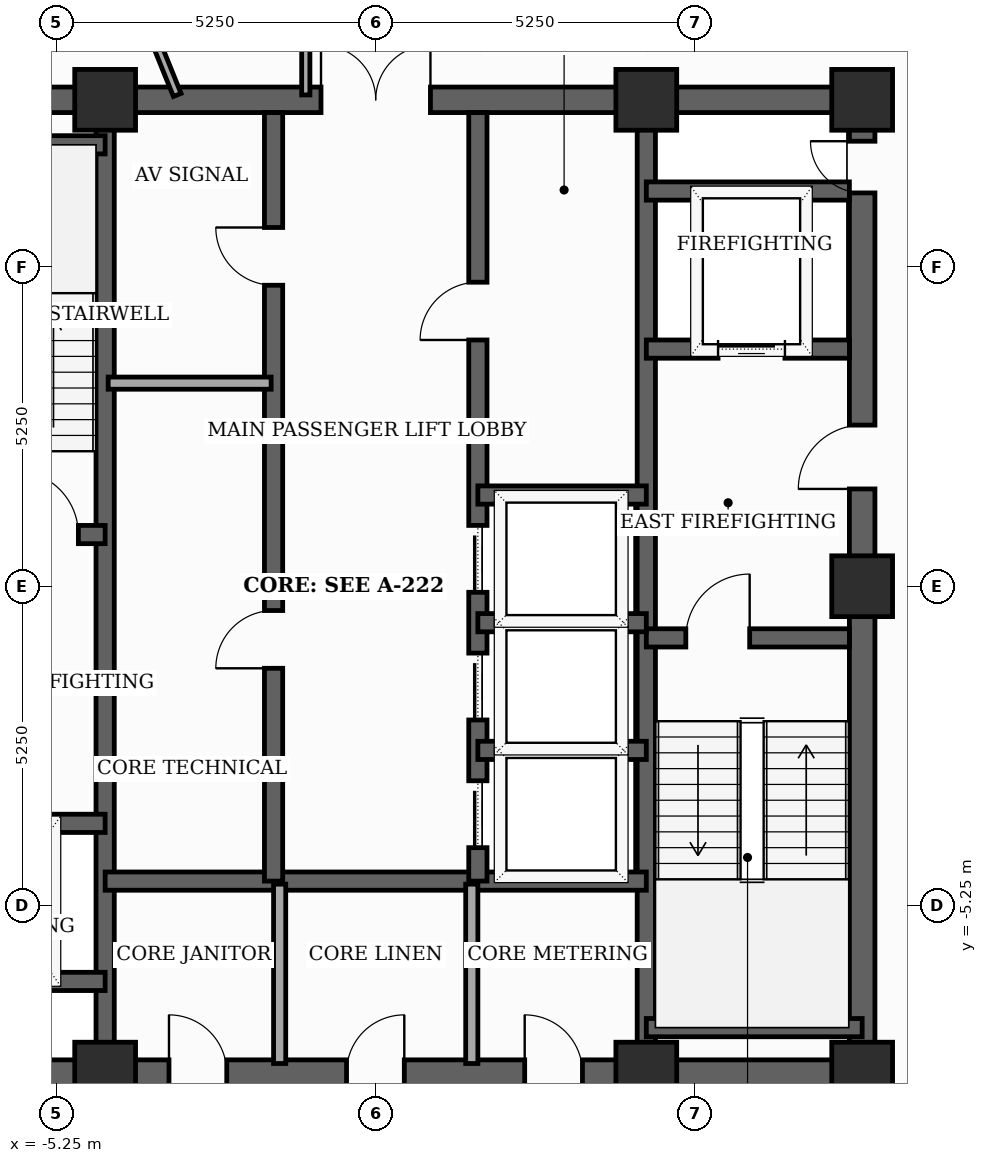
"""IFC4 building model, lengths in metres.
Left out: names, types, materials, properties, quantities, classifications, styles, units other than length and angle.
Written with IfcOpenShell. Run it as: python <this file> out.ifc"""

import sys

from ifc_helpers import new_model, si_unit, direction, frame, frame_2d, origin, origin_2d, place, context, subcontext, project, spatial, rectangle, extrude, element, fill, save


model = new_model("IFC4")
c1 = context("Model", 3, precision=1e-05, world=origin(), true_north=direction((0.0, 1.0)))
c2 = subcontext(c1, "Body", "Model", "MODEL_VIEW")
j1 = project(units=[si_unit("LENGTHUNIT", "METRE"), si_unit("PLANEANGLEUNIT", "RADIAN")], contexts=[c1])
p1 = place(None, origin())
s1 = spatial("IfcSite", under=j1, at=p1, CompositionType="ELEMENT")
p2 = place(p1, origin())
s2 = spatial("IfcBuilding", under=s1, at=p2, CompositionType="ELEMENT")
p3 = place(p2, frame((0.0, 0.0, 267.0)))
s3 = spatial("IfcBuildingStorey", under=s2, at=p3, CompositionType="ELEMENT", Elevation=267.0)
for number, where, z_axis, x_axis in (
    (1, (-4.45, -8.0, 0.0), (0.0, 0.0, 1.0), (1.0, 0.0, 0.0)),
    (2, (4.45, -8.0, 0.0), (0.0, 0.0, 1.0), (1.0, 0.0, 0.0)),
    (3, (8.0, -8.0, 0.0), (0.0, 0.0, 1.0), (1.0, 0.0, 0.0)),
    (4, (8.0, 0.0, 0.0), (0.0, 0.0, 1.0), (1.0, 0.0, 0.0)),
    (5, (8.0, 8.0, 0.0), (0.0, 0.0, 1.0), (1.0, 0.0, 0.0)),
    (6, (4.45, 8.0, 0.0), (0.0, 0.0, 1.0), (1.0, 0.0, 0.0)),
    (7, (-4.45, 8.0, 0.0), (0.0, 0.0, 1.0), (1.0, 0.0, 0.0)),
):
    element("IfcColumn", number, at=place(p3, frame(where, z_axis=z_axis, x_axis=x_axis)), inside=s3, PredefinedType="COLUMN", context=c2, shape_type="SweptSolid", body=[
        extrude(rectangle(XDim=1.0, YDim=1.0, at=origin_2d()), origin(), (0.0, 0.0, 1.0), 3.7),
    ])
p4 = place(p3, frame((8.0, -8.0, 0.0), z_axis=(0.0, 0.0, 1.0), x_axis=(0.0, 1.0, 0.0)))
e8 = element("IfcWall", 8, at=p4, inside=s3, PredefinedType="SHEAR", context=c2, shape_type="SweptSolid", body=[
    extrude(rectangle(XDim=16.0, YDim=0.42, at=frame_2d((8.0, 0.0))), origin(), (0.0, 0.0, 1.0), 3.5),
])
p5 = place(p4, frame((9.6, 0.0, 0.0)))
e9 = element("IfcOpeningElement", 9, at=p5, cuts=e8, PredefinedType="OPENING", context=c2, shape_type="SweptSolid", body=[
    extrude(rectangle(XDim=1.05, YDim=2.15, at=frame_2d((0.525, 1.075))), frame((0.0, 0.22, 0.0), z_axis=(0.0, -1.0, 0.0), x_axis=(1.0, 0.0, 0.0)), (0.0, 0.0, 1.0), 0.44),
])
p6 = place(p4, frame((14.469, 0.0, 0.0)))
e10 = element("IfcOpeningElement", 10, at=p6, cuts=e8, PredefinedType="OPENING", context=c2, shape_type="SweptSolid", body=[
    extrude(rectangle(XDim=0.85, YDim=2.02, at=frame_2d((0.425, 1.01))), frame((0.0, 0.22, 0.0), z_axis=(0.0, -1.0, 0.0), x_axis=(1.0, 0.0, 0.0)), (0.0, 0.0, 1.0), 0.44),
])
p7 = place(p3, frame((-8.0, -8.0, 0.0), z_axis=(0.0, 0.0, 1.0), x_axis=(1.0, 0.0, 0.0)))
e11 = element("IfcWall", 11, at=p7, inside=s3, PredefinedType="SHEAR", context=c2, shape_type="SweptSolid", body=[
    extrude(rectangle(XDim=16.0, YDim=0.42, at=frame_2d((8.0, 0.0))), origin(), (0.0, 0.0, 1.0), 3.5),
])
p8 = place(p7, frame((4.6, 0.0, 0.0)))
e12 = element("IfcOpeningElement", 12, at=p8, cuts=e11, PredefinedType="OPENING", context=c2, shape_type="SweptSolid", body=[
    extrude(rectangle(XDim=0.95, YDim=2.1, at=frame_2d((0.475, 1.05))), frame((0.0, 0.22, 0.0), z_axis=(0.0, -1.0, 0.0), x_axis=(1.0, 0.0, 0.0)), (0.0, 0.0, 1.0), 0.44),
])
p9 = place(p7, frame((7.52, 0.0, 0.0)))
e13 = element("IfcOpeningElement", 13, at=p9, cuts=e11, PredefinedType="OPENING", context=c2, shape_type="SweptSolid", body=[
    extrude(rectangle(XDim=0.95, YDim=2.1, at=frame_2d((0.475, 1.05))), frame((0.0, 0.22, 0.0), z_axis=(0.0, -1.0, 0.0), x_axis=(1.0, 0.0, 0.0)), (0.0, 0.0, 1.0), 0.44),
])
p10 = place(p7, frame((10.45, 0.0, 0.0)))
e14 = element("IfcOpeningElement", 14, at=p10, cuts=e11, PredefinedType="OPENING", context=c2, shape_type="SweptSolid", body=[
    extrude(rectangle(XDim=0.95, YDim=2.1, at=frame_2d((0.475, 1.05))), frame((0.0, 0.22, 0.0), z_axis=(0.0, -1.0, 0.0), x_axis=(1.0, 0.0, 0.0)), (0.0, 0.0, 1.0), 0.44),
])
p11 = place(p3, frame((-8.0, 8.0, 0.0), z_axis=(0.0, 0.0, 1.0), x_axis=(1.0, 0.0, 0.0)))
e15 = element("IfcWall", 15, at=p11, inside=s3, PredefinedType="SHEAR", context=c2, shape_type="SweptSolid", body=[
    extrude(rectangle(XDim=16.0, YDim=0.42, at=frame_2d((8.0, 0.0))), origin(), (0.0, 0.0, 1.0), 3.5),
])
p12 = place(p11, frame((7.1, 0.0, 0.0)))
e16 = element("IfcOpeningElement", 16, at=p12, cuts=e15, PredefinedType="OPENING", context=c2, shape_type="SweptSolid", body=[
    extrude(rectangle(XDim=1.8, YDim=2.15, at=frame_2d((0.9, 1.075))), frame((0.0, 0.22, 0.0), z_axis=(0.0, -1.0, 0.0), x_axis=(1.0, 0.0, 0.0)), (0.0, 0.0, 1.0), 0.44),
])
for number, where, z_axis, x_axis in (
    (17, (-4.45, -7.79, 0.0), (0.0, 0.0, 1.0), (0.0, 1.0, 0.0)),
    (18, (4.45, -7.79, 0.0), (0.0, 0.0, 1.0), (0.0, 1.0, 0.0)),
):
    element("IfcWall", number, at=place(p3, frame(where, z_axis=z_axis, x_axis=x_axis)), inside=s3, PredefinedType="SHEAR", context=c2, shape_type="SweptSolid", body=[
        extrude(rectangle(XDim=15.58, YDim=0.3, at=frame_2d((7.79, 0.0))), origin(), (0.0, 0.0, 1.0), 3.5),
    ])
p13 = place(p3, frame((-7.79, 0.85, 0.0), z_axis=(0.0, 0.0, 1.0), x_axis=(1.0, 0.0, 0.0)))
e19 = element("IfcWall", 19, at=p13, inside=s3, PredefinedType="SHEAR", context=c2, shape_type="SweptSolid", body=[
    extrude(rectangle(XDim=3.34, YDim=0.3, at=frame_2d((1.67, 0.0))), origin(), (0.0, 0.0, 1.0), 3.5),
])
p14 = place(p13, frame((1.85, 0.0, 0.0)))
e20 = element("IfcOpeningElement", 20, at=p14, cuts=e19, PredefinedType="OPENING", context=c2, shape_type="SweptSolid", body=[
    extrude(rectangle(XDim=1.05, YDim=2.15, at=frame_2d((0.525, 1.075))), frame((0.0, 0.16, 0.0), z_axis=(0.0, -1.0, 0.0), x_axis=(1.0, 0.0, 0.0)), (0.0, 0.0, 1.0), 0.32),
])
p15 = place(p3, frame((-7.79, 7.26, 0.0), z_axis=(0.0, 0.0, 1.0), x_axis=(1.0, 0.0, 0.0)))
e21 = element("IfcWall", 21, at=p15, inside=s3, PredefinedType="SHEAR", context=c2, shape_type="SweptSolid", body=[
    extrude(rectangle(XDim=3.34, YDim=0.3, at=frame_2d((1.67, 0.0))), origin(), (0.0, 0.0, 1.0), 3.5),
])
p16 = place(p3, frame((4.45, -0.85, 0.0), z_axis=(0.0, 0.0, 1.0), x_axis=(1.0, 0.0, 0.0)))
e22 = element("IfcWall", 22, at=p16, inside=s3, PredefinedType="SHEAR", context=c2, shape_type="SweptSolid", body=[
    extrude(rectangle(XDim=3.34, YDim=0.3, at=frame_2d((1.67, 0.0))), origin(), (0.0, 0.0, 1.0), 3.5),
])
p17 = place(p16, frame((0.65, 0.0, 0.0)))
e23 = element("IfcOpeningElement", 23, at=p17, cuts=e22, PredefinedType="OPENING", context=c2, shape_type="SweptSolid", body=[
    extrude(rectangle(XDim=1.05, YDim=2.15, at=frame_2d((0.525, 1.075))), frame((0.0, 0.16, 0.0), z_axis=(0.0, -1.0, 0.0), x_axis=(1.0, 0.0, 0.0)), (0.0, 0.0, 1.0), 0.32),
])
p18 = place(p3, frame((4.45, -7.26, 0.0), z_axis=(0.0, 0.0, 1.0), x_axis=(1.0, 0.0, 0.0)))
e24 = element("IfcWall", 24, at=p18, inside=s3, PredefinedType="SHEAR", context=c2, shape_type="SweptSolid", body=[
    extrude(rectangle(XDim=3.55, YDim=0.3, at=frame_2d((1.775, 0.0))), origin(), (0.0, 0.0, 1.0), 3.5),
])
p19 = place(p3, frame((-7.79, -3.9, 0.0), z_axis=(0.0, 0.0, 1.0), x_axis=(1.0, 0.0, 0.0)))
e25 = element("IfcWall", 25, at=p19, inside=s3, PredefinedType="SHEAR", context=c2, shape_type="SweptSolid", body=[
    extrude(rectangle(XDim=3.34, YDim=0.3, at=frame_2d((1.67, 0.0))), origin(), (0.0, 0.0, 1.0), 3.5),
])
p20 = place(p19, frame((1.27, 0.0, 0.0)))
e26 = element("IfcOpeningElement", 26, at=p20, cuts=e25, PredefinedType="OPENING", context=c2, shape_type="SweptSolid", body=[
    extrude(rectangle(XDim=1.1, YDim=2.1, at=frame_2d((0.55, 1.05))), frame((0.0, 0.16, 0.0), z_axis=(0.0, -1.0, 0.0), x_axis=(1.0, 0.0, 0.0)), (0.0, 0.0, 1.0), 0.32),
])
p21 = place(p3, frame((-7.79, -6.5, 0.0), z_axis=(0.0, 0.0, 1.0), x_axis=(1.0, 0.0, 0.0)))
e27 = element("IfcWall", 27, at=p21, inside=s3, PredefinedType="SHEAR", context=c2, shape_type="SweptSolid", body=[
    extrude(rectangle(XDim=3.34, YDim=0.3, at=frame_2d((1.67, 0.0))), origin(), (0.0, 0.0, 1.0), 3.5),
])
p22 = place(p3, frame((4.45, 3.9, 0.0), z_axis=(0.0, 0.0, 1.0), x_axis=(1.0, 0.0, 0.0)))
e28 = element("IfcWall", 28, at=p22, inside=s3, PredefinedType="SHEAR", context=c2, shape_type="SweptSolid", body=[
    extrude(rectangle(XDim=3.34, YDim=0.3, at=frame_2d((1.67, 0.0))), origin(), (0.0, 0.0, 1.0), 3.5),
])
p23 = place(p22, frame((1.18, 0.0, 0.0)))
e29 = element("IfcOpeningElement", 29, at=p23, cuts=e28, PredefinedType="OPENING", context=c2, shape_type="SweptSolid", body=[
    extrude(rectangle(XDim=1.1, YDim=2.1, at=frame_2d((0.55, 1.05))), frame((0.0, 0.16, 0.0), z_axis=(0.0, -1.0, 0.0), x_axis=(1.0, 0.0, 0.0)), (0.0, 0.0, 1.0), 0.32),
])
p24 = place(p3, frame((4.45, 6.5, 0.0), z_axis=(0.0, 0.0, 1.0), x_axis=(1.0, 0.0, 0.0)))
e30 = element("IfcWall", 30, at=p24, inside=s3, PredefinedType="SHEAR", context=c2, shape_type="SweptSolid", body=[
    extrude(rectangle(XDim=3.34, YDim=0.3, at=frame_2d((1.67, 0.0))), origin(), (0.0, 0.0, 1.0), 3.5),
])
p25 = place(p3, frame((-4.45, -4.85, 0.0), z_axis=(0.0, 0.0, 1.0), x_axis=(1.0, 0.0, 0.0)))
e31 = element("IfcWall", 31, at=p25, inside=s3, PredefinedType="SHEAR", context=c2, shape_type="SweptSolid", body=[
    extrude(rectangle(XDim=8.9, YDim=0.3, at=frame_2d((4.45, 0.0))), origin(), (0.0, 0.0, 1.0), 3.5),
])
p26 = place(p3, frame((-1.68, -4.85, 0.0), z_axis=(0.0, 0.0, 1.0), x_axis=(0.0, 1.0, 0.0)))
e32 = element("IfcWall", 32, at=p26, inside=s3, PredefinedType="SHEAR", context=c2, shape_type="SweptSolid", body=[
    extrude(rectangle(XDim=12.64, YDim=0.3, at=frame_2d((6.32, 0.0))), origin(), (0.0, 0.0, 1.0), 3.5),
])
p27 = place(p26, frame((3.5, 0.0, 0.0)))
e33 = element("IfcOpeningElement", 33, at=p27, cuts=e32, PredefinedType="OPENING", context=c2, shape_type="SweptSolid", body=[
    extrude(rectangle(XDim=0.95, YDim=2.1, at=frame_2d((0.475, 1.05))), frame((0.0, 0.16, 0.0), z_axis=(0.0, -1.0, 0.0), x_axis=(1.0, 0.0, 0.0)), (0.0, 0.0, 1.0), 0.32),
])
p28 = place(p26, frame((9.8, 0.0, 0.0)))
e34 = element("IfcOpeningElement", 34, at=p28, cuts=e32, PredefinedType="OPENING", context=c2, shape_type="SweptSolid", body=[
    extrude(rectangle(XDim=0.95, YDim=2.1, at=frame_2d((0.475, 1.05))), frame((0.0, 0.16, 0.0), z_axis=(0.0, -1.0, 0.0), x_axis=(1.0, 0.0, 0.0)), (0.0, 0.0, 1.0), 0.32),
])
p29 = place(p3, frame((1.68, -4.85, 0.0), z_axis=(0.0, 0.0, 1.0), x_axis=(0.0, 1.0, 0.0)))
e35 = element("IfcWall", 35, at=p29, inside=s3, PredefinedType="SHEAR", context=c2, shape_type="SweptSolid", body=[
    extrude(rectangle(XDim=12.64, YDim=0.3, at=frame_2d((6.32, 0.0))), origin(), (0.0, 0.0, 1.0), 3.5),
])
p30 = place(p29, frame((0.55, 0.0, 0.0)))
e36 = element("IfcOpeningElement", 36, at=p30, cuts=e35, PredefinedType="OPENING", context=c2, shape_type="SweptSolid", body=[
    extrude(rectangle(XDim=1.1, YDim=2.1, at=frame_2d((0.55, 1.05))), frame((0.0, 0.16, 0.0), z_axis=(0.0, -1.0, 0.0), x_axis=(1.0, 0.0, 0.0)), (0.0, 0.0, 1.0), 0.32),
])
p31 = place(p29, frame((2.65, 0.0, 0.0)))
e37 = element("IfcOpeningElement", 37, at=p31, cuts=e35, PredefinedType="OPENING", context=c2, shape_type="SweptSolid", body=[
    extrude(rectangle(XDim=1.1, YDim=2.1, at=frame_2d((0.55, 1.05))), frame((0.0, 0.16, 0.0), z_axis=(0.0, -1.0, 0.0), x_axis=(1.0, 0.0, 0.0)), (0.0, 0.0, 1.0), 0.32),
])
p32 = place(p29, frame((4.75, 0.0, 0.0)))
e38 = element("IfcOpeningElement", 38, at=p32, cuts=e35, PredefinedType="OPENING", context=c2, shape_type="SweptSolid", body=[
    extrude(rectangle(XDim=1.1, YDim=2.1, at=frame_2d((0.55, 1.05))), frame((0.0, 0.16, 0.0), z_axis=(0.0, -1.0, 0.0), x_axis=(1.0, 0.0, 0.0)), (0.0, 0.0, 1.0), 0.32),
])
p33 = place(p29, frame((8.9, 0.0, 0.0)))
e39 = element("IfcOpeningElement", 39, at=p33, cuts=e35, PredefinedType="OPENING", context=c2, shape_type="SweptSolid", body=[
    extrude(rectangle(XDim=0.95, YDim=2.1, at=frame_2d((0.475, 1.05))), frame((0.0, 0.16, 0.0), z_axis=(0.0, -1.0, 0.0), x_axis=(1.0, 0.0, 0.0)), (0.0, 0.0, 1.0), 0.32),
])
for number, where, z_axis, x_axis in (
    (40, (1.68, 1.5, 0.0), (0.0, 0.0, 1.0), (1.0, 0.0, 0.0)),
    (41, (1.68, -2.7, 0.0), (0.0, 0.0, 1.0), (1.0, 0.0, 0.0)),
    (42, (1.68, -0.6, 0.0), (0.0, 0.0, 1.0), (1.0, 0.0, 0.0)),
):
    element("IfcWall", number, at=place(p3, frame(where, z_axis=z_axis, x_axis=x_axis)), inside=s3, PredefinedType="SHEAR", context=c2, shape_type="SweptSolid", body=[
        extrude(rectangle(XDim=2.77, YDim=0.3, at=frame_2d((1.385, 0.0))), origin(), (0.0, 0.0, 1.0), 3.5),
    ])
for number, where, z_axis, x_axis in (
    (43, (-1.58, -7.85, 0.0), (0.0, 0.0, 1.0), (0.0, 1.0, 0.0)),
    (44, (1.58, -7.85, 0.0), (0.0, 0.0, 1.0), (0.0, 1.0, 0.0)),
):
    element("IfcWall", number, at=place(p3, frame(where, z_axis=z_axis, x_axis=x_axis)), inside=s3, PredefinedType="SOLIDWALL", context=c2, shape_type="SweptSolid", body=[
        extrude(rectangle(XDim=2.95, YDim=0.2, at=frame_2d((1.475, 0.0))), origin(), (0.0, 0.0, 1.0), 2.885),
    ])
p34 = place(p3, frame((-4.4, 3.34, 0.0), z_axis=(0.0, 0.0, 1.0), x_axis=(1.0, 0.0, 0.0)))
e45 = element("IfcWall", 45, at=p34, inside=s3, PredefinedType="SOLIDWALL", context=c2, shape_type="SweptSolid", body=[
    extrude(rectangle(XDim=2.68, YDim=0.2, at=frame_2d((1.34, 0.0))), origin(), (0.0, 0.0, 1.0), 3.5),
])
p35 = place(p3, frame((-1.15, 10.65, 0.0), z_axis=(0.0, 0.0, 1.0), x_axis=(0.0, -1.0, 0.0)))
e46 = element("IfcWall", 46, at=p35, inside=s3, PredefinedType="PARTITIONING", context=c2, shape_type="SweptSolid", body=[
    extrude(rectangle(XDim=2.57, YDim=0.135, at=frame_2d((1.285, 0.0))), origin(), (0.0, 0.0, 1.0), 2.085),
])
p36 = place(p3, frame((-5.896, 14.593, 0.0), z_axis=(0.0, 0.0, 1.0), x_axis=(0.374630268076, -0.927174289032, 0.0)))
e47 = element("IfcWall", 47, at=p36, inside=s3, PredefinedType="PARTITIONING", context=c2, shape_type="SweptSolid", body=[
    extrude(rectangle(XDim=7.024, YDim=0.135, at=frame_2d((3.512, 0.0))), origin(), (0.0, 0.0, 1.0), 2.085),
])
p37 = place(p36, frame((3.5, 0.0, 0.0)))
e48 = element("IfcOpeningElement", 48, at=p37, cuts=e47, PredefinedType="OPENING", context=c2, shape_type="SweptSolid", body=[
    extrude(rectangle(XDim=0.92, YDim=2.035, at=frame_2d((0.46, 1.018))), frame((0.0, 0.077, 0.0), z_axis=(0.0, -1.0, 0.0), x_axis=(1.0, 0.0, 0.0)), (0.0, 0.0, 1.0), 0.155),
])
p38 = place(p5, origin())
e49 = element("IfcDoor", 49, at=p38, inside=s3, OperationType="SINGLE_SWING_LEFT", PredefinedType="DOOR", context=c2, shape_type="SweptSolid", body=[
    extrude(rectangle(XDim=1.05, YDim=2.15, at=frame_2d((0.525, 1.075))), frame((0.0, 0.025, 0.0), z_axis=(0.0, -1.0, 0.0), x_axis=(1.0, 0.0, 0.0)), (0.0, 0.0, 1.0), 0.05),
])
fill(e9, e49)
p39 = place(p6, origin())
e50 = element("IfcDoor", 50, at=p39, inside=s3, OperationType="SINGLE_SWING_RIGHT", PredefinedType="TRAPDOOR", context=c2, shape_type="SweptSolid", body=[
    extrude(rectangle(XDim=0.85, YDim=2.02, at=frame_2d((0.425, 1.01))), frame((0.0, 0.025, 0.0), z_axis=(0.0, -1.0, 0.0), x_axis=(1.0, 0.0, 0.0)), (0.0, 0.0, 1.0), 0.05),
])
fill(e10, e50)
p40 = place(p8, origin())
e51 = element("IfcDoor", 51, at=p40, inside=s3, OperationType="SINGLE_SWING_LEFT", PredefinedType="DOOR", context=c2, shape_type="SweptSolid", body=[
    extrude(rectangle(XDim=0.95, YDim=2.1, at=frame_2d((0.475, 1.05))), frame((0.0, 0.025, 0.0), z_axis=(0.0, -1.0, 0.0), x_axis=(1.0, 0.0, 0.0)), (0.0, 0.0, 1.0), 0.05),
])
fill(e12, e51)
p41 = place(p9, origin())
e52 = element("IfcDoor", 52, at=p41, inside=s3, OperationType="SINGLE_SWING_RIGHT", PredefinedType="DOOR", context=c2, shape_type="SweptSolid", body=[
    extrude(rectangle(XDim=0.95, YDim=2.1, at=frame_2d((0.475, 1.05))), frame((0.0, 0.025, 0.0), z_axis=(0.0, -1.0, 0.0), x_axis=(1.0, 0.0, 0.0)), (0.0, 0.0, 1.0), 0.05),
])
fill(e13, e52)
p42 = place(p10, origin())
e53 = element("IfcDoor", 53, at=p42, inside=s3, OperationType="SINGLE_SWING_LEFT", PredefinedType="DOOR", context=c2, shape_type="SweptSolid", body=[
    extrude(rectangle(XDim=0.95, YDim=2.1, at=frame_2d((0.475, 1.05))), frame((0.0, 0.025, 0.0), z_axis=(0.0, -1.0, 0.0), x_axis=(1.0, 0.0, 0.0)), (0.0, 0.0, 1.0), 0.05),
])
fill(e14, e53)
p43 = place(p12, origin())
e54 = element("IfcDoor", 54, at=p43, inside=s3, OperationType="DOUBLE_DOOR_SINGLE_SWING", PredefinedType="DOOR", context=c2, shape_type="SweptSolid", body=[
    extrude(rectangle(XDim=1.8, YDim=2.15, at=frame_2d((0.9, 1.075))), frame((0.0, 0.025, 0.0), z_axis=(0.0, -1.0, 0.0), x_axis=(1.0, 0.0, 0.0)), (0.0, 0.0, 1.0), 0.05),
])
fill(e16, e54)
p44 = place(p14, origin())
e55 = element("IfcDoor", 55, at=p44, inside=s3, OperationType="SINGLE_SWING_LEFT", PredefinedType="DOOR", context=c2, shape_type="SweptSolid", body=[
    extrude(rectangle(XDim=1.05, YDim=2.15, at=frame_2d((0.525, 1.075))), frame((0.0, 0.025, 0.0), z_axis=(0.0, -1.0, 0.0), x_axis=(1.0, 0.0, 0.0)), (0.0, 0.0, 1.0), 0.05),
])
fill(e20, e55)
p45 = place(p17, origin())
e56 = element("IfcDoor", 56, at=p45, inside=s3, OperationType="SINGLE_SWING_RIGHT", PredefinedType="DOOR", context=c2, shape_type="SweptSolid", body=[
    extrude(rectangle(XDim=1.05, YDim=2.15, at=frame_2d((0.525, 1.075))), frame((0.0, 0.025, 0.0), z_axis=(0.0, -1.0, 0.0), x_axis=(1.0, 0.0, 0.0)), (0.0, 0.0, 1.0), 0.05),
])
fill(e23, e56)
p46 = place(p23, origin())
e57 = element("IfcDoor", 57, at=p46, inside=s3, OperationType="SLIDING_TO_LEFT", PredefinedType="DOOR", context=c2, shape_type="SweptSolid", body=[
    extrude(rectangle(XDim=1.1, YDim=2.1, at=frame_2d((0.55, 1.05))), frame((0.0, 0.025, 0.0), z_axis=(0.0, -1.0, 0.0), x_axis=(1.0, 0.0, 0.0)), (0.0, 0.0, 1.0), 0.05),
])
fill(e29, e57)
p47 = place(p27, origin())
e58 = element("IfcDoor", 58, at=p47, inside=s3, OperationType="SINGLE_SWING_LEFT", PredefinedType="DOOR", context=c2, shape_type="SweptSolid", body=[
    extrude(rectangle(XDim=0.95, YDim=2.1, at=frame_2d((0.475, 1.05))), frame((0.0, 0.025, 0.0), z_axis=(0.0, -1.0, 0.0), x_axis=(1.0, 0.0, 0.0)), (0.0, 0.0, 1.0), 0.05),
])
fill(e33, e58)
p48 = place(p28, origin())
e59 = element("IfcDoor", 59, at=p48, inside=s3, OperationType="SINGLE_SWING_RIGHT", PredefinedType="DOOR", context=c2, shape_type="SweptSolid", body=[
    extrude(rectangle(XDim=0.95, YDim=2.1, at=frame_2d((0.475, 1.05))), frame((0.0, 0.025, 0.0), z_axis=(0.0, -1.0, 0.0), x_axis=(1.0, 0.0, 0.0)), (0.0, 0.0, 1.0), 0.05),
])
fill(e34, e59)
p49 = place(p30, origin())
e60 = element("IfcDoor", 60, at=p49, inside=s3, OperationType="SLIDING_TO_LEFT", PredefinedType="DOOR", context=c2, shape_type="SweptSolid", body=[
    extrude(rectangle(XDim=1.1, YDim=2.1, at=frame_2d((0.55, 1.05))), frame((0.0, 0.025, 0.0), z_axis=(0.0, -1.0, 0.0), x_axis=(1.0, 0.0, 0.0)), (0.0, 0.0, 1.0), 0.05),
])
fill(e36, e60)
p50 = place(p31, origin())
e61 = element("IfcDoor", 61, at=p50, inside=s3, OperationType="SLIDING_TO_LEFT", PredefinedType="DOOR", context=c2, shape_type="SweptSolid", body=[
    extrude(rectangle(XDim=1.1, YDim=2.1, at=frame_2d((0.55, 1.05))), frame((0.0, 0.025, 0.0), z_axis=(0.0, -1.0, 0.0), x_axis=(1.0, 0.0, 0.0)), (0.0, 0.0, 1.0), 0.05),
])
fill(e37, e61)
p51 = place(p32, origin())
e62 = element("IfcDoor", 62, at=p51, inside=s3, OperationType="SLIDING_TO_LEFT", PredefinedType="DOOR", context=c2, shape_type="SweptSolid", body=[
    extrude(rectangle(XDim=1.1, YDim=2.1, at=frame_2d((0.55, 1.05))), frame((0.0, 0.025, 0.0), z_axis=(0.0, -1.0, 0.0), x_axis=(1.0, 0.0, 0.0)), (0.0, 0.0, 1.0), 0.05),
])
fill(e38, e62)
p52 = place(p33, origin())
e63 = element("IfcDoor", 63, at=p52, inside=s3, OperationType="SINGLE_SWING_LEFT", PredefinedType="DOOR", context=c2, shape_type="SweptSolid", body=[
    extrude(rectangle(XDim=0.95, YDim=2.1, at=frame_2d((0.475, 1.05))), frame((0.0, 0.025, 0.0), z_axis=(0.0, -1.0, 0.0), x_axis=(1.0, 0.0, 0.0)), (0.0, 0.0, 1.0), 0.05),
])
fill(e39, e63)
save(model, sys.argv[1])
